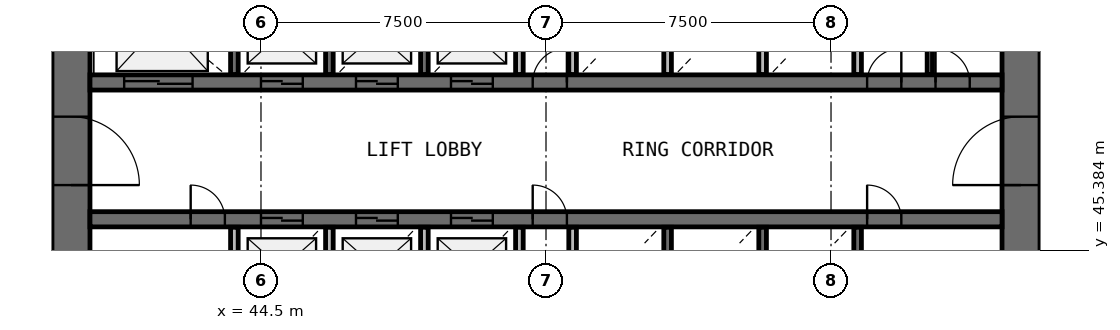
"""IFC4 building model, lengths in metres.
Left out: names, types, materials, properties, quantities, classifications, styles, units other than length and angle.
Written with IfcOpenShell. Run it as: python <this file> out.ifc"""

import sys

from ifc_helpers import new_model, si_unit, direction, frame, frame_2d, origin, place, context, subcontext, project, spatial, rectangle, extrude, source, transform, mapped, element, fill, save


model = new_model("IFC4")
c1 = context("Model", 3, precision=1e-05, world=origin(), true_north=direction((0.0, 1.0)))
c2 = subcontext(c1, "Body", "Model", "MODEL_VIEW")
j1 = project(units=[si_unit("LENGTHUNIT", "METRE"), si_unit("PLANEANGLEUNIT", "RADIAN")], contexts=[c1])
p1 = place(None, origin())
s1 = spatial("IfcSite", under=j1, at=p1, CompositionType="ELEMENT")
p2 = place(p1, origin())
s2 = spatial("IfcBuilding", under=s1, at=p2, CompositionType="ELEMENT")
p3 = place(p2, frame((0.0, 0.0, 40.2)))
s3 = spatial("IfcBuildingStorey", under=s2, at=p3, CompositionType="ELEMENT", Elevation=40.2)
p4 = place(p3, frame((64.5, 38.0, 0.0), z_axis=(0.0, 0.0, 1.0), x_axis=(0.0, 1.0, 0.0)))
e1 = element("IfcWall", 1, at=p4, inside=s3, PredefinedType="SHEAR", context=c2, shape_type="SweptSolid", body=[
    extrude(rectangle(XDim=20.0, YDim=1.0, at=frame_2d((10.0, 0.0))), origin(), (0.0, 0.0, 1.0), 4.4),
])
p5 = place(p4, frame((9.1, 0.0, 0.0)))
e2 = element("IfcOpeningElement", 2, at=p5, cuts=e1, PredefinedType="OPENING", context=c2, shape_type="SweptSolid", body=[
    extrude(rectangle(XDim=1.8, YDim=2.1, at=frame_2d((0.9, 1.05))), frame((0.0, 0.51, 0.0), z_axis=(0.0, -1.0, 0.0), x_axis=(1.0, 0.0, 0.0)), (0.0, 0.0, 1.0), 1.02),
])
p6 = place(p3, frame((39.5, 58.0, 0.0), z_axis=(0.0, 0.0, 1.0), x_axis=(0.0, -1.0, 0.0)))
e3 = element("IfcWall", 3, at=p6, inside=s3, PredefinedType="SHEAR", context=c2, shape_type="SweptSolid", body=[
    extrude(rectangle(XDim=20.0, YDim=1.0, at=frame_2d((10.0, 0.0))), origin(), (0.0, 0.0, 1.0), 4.4),
])
p7 = place(p6, frame((9.1, 0.0, 0.0)))
e4 = element("IfcOpeningElement", 4, at=p7, cuts=e3, PredefinedType="OPENING", context=c2, shape_type="SweptSolid", body=[
    extrude(rectangle(XDim=1.8, YDim=2.1, at=frame_2d((0.9, 1.05))), frame((0.0, 0.51, 0.0), z_axis=(0.0, -1.0, 0.0), x_axis=(1.0, 0.0, 0.0)), (0.0, 0.0, 1.0), 1.02),
])
p8 = place(p3, frame((40.0, 49.8, 0.0), z_axis=(0.0, 0.0, 1.0), x_axis=(1.0, 0.0, 0.0)))
e5 = element("IfcWall", 5, at=p8, inside=s3, PredefinedType="SHEAR", context=c2, shape_type="SweptSolid", body=[
    extrude(rectangle(XDim=24.0, YDim=0.4, at=frame_2d((12.0, 0.0))), origin(), (0.0, 0.0, 1.0), 4.4),
])
p9 = place(p8, frame((4.5, 0.0, 0.0)))
e6 = element("IfcOpeningElement", 6, at=p9, cuts=e5, PredefinedType="OPENING", context=c2, shape_type="SweptSolid", body=[
    extrude(rectangle(XDim=1.1, YDim=2.1, at=frame_2d((0.55, 1.05))), frame((0.0, 0.21, 0.0), z_axis=(0.0, -1.0, 0.0), x_axis=(1.0, 0.0, 0.0)), (0.0, 0.0, 1.0), 0.42),
])
p10 = place(p8, frame((7.0, 0.0, 0.0)))
e7 = element("IfcOpeningElement", 7, at=p10, cuts=e5, PredefinedType="OPENING", context=c2, shape_type="SweptSolid", body=[
    extrude(rectangle(XDim=1.1, YDim=2.1, at=frame_2d((0.55, 1.05))), frame((0.0, 0.21, 0.0), z_axis=(0.0, -1.0, 0.0), x_axis=(1.0, 0.0, 0.0)), (0.0, 0.0, 1.0), 0.42),
])
p11 = place(p8, frame((9.5, 0.0, 0.0)))
e8 = element("IfcOpeningElement", 8, at=p11, cuts=e5, PredefinedType="OPENING", context=c2, shape_type="SweptSolid", body=[
    extrude(rectangle(XDim=1.1, YDim=2.1, at=frame_2d((0.55, 1.05))), frame((0.0, 0.21, 0.0), z_axis=(0.0, -1.0, 0.0), x_axis=(1.0, 0.0, 0.0)), (0.0, 0.0, 1.0), 0.42),
])
p12 = place(p8, frame((0.9, 0.0, 0.0)))
e9 = element("IfcOpeningElement", 9, at=p12, cuts=e5, PredefinedType="OPENING", context=c2, shape_type="SweptSolid", body=[
    extrude(rectangle(XDim=1.8, YDim=2.4, at=frame_2d((0.9, 1.2))), frame((0.0, 0.21, 0.0), z_axis=(0.0, -1.0, 0.0), x_axis=(1.0, 0.0, 0.0)), (0.0, 0.0, 1.0), 0.42),
])
p13 = place(p8, frame((20.45, 0.0, 0.0)))
e10 = element("IfcOpeningElement", 10, at=p13, cuts=e5, PredefinedType="OPENING", context=c2, shape_type="SweptSolid", body=[
    extrude(rectangle(XDim=0.9, YDim=2.1, at=frame_2d((0.45, 1.05))), frame((0.0, 0.21, 0.0), z_axis=(0.0, -1.0, 0.0), x_axis=(1.0, 0.0, 0.0)), (0.0, 0.0, 1.0), 0.42),
])
p14 = place(p8, frame((22.25, 0.0, 0.0)))
e11 = element("IfcOpeningElement", 11, at=p14, cuts=e5, PredefinedType="OPENING", context=c2, shape_type="SweptSolid", body=[
    extrude(rectangle(XDim=0.9, YDim=2.1, at=frame_2d((0.45, 1.05))), frame((0.0, 0.21, 0.0), z_axis=(0.0, -1.0, 0.0), x_axis=(1.0, 0.0, 0.0)), (0.0, 0.0, 1.0), 0.42),
])
p15 = place(p8, frame((11.65, 0.0, 0.0)))
e12 = element("IfcOpeningElement", 12, at=p15, cuts=e5, PredefinedType="OPENING", context=c2, shape_type="SweptSolid", body=[
    extrude(rectangle(XDim=0.9, YDim=2.1, at=frame_2d((0.45, 1.05))), frame((0.0, 0.21, 0.0), z_axis=(0.0, -1.0, 0.0), x_axis=(1.0, 0.0, 0.0)), (0.0, 0.0, 1.0), 0.42),
])
p16 = place(p3, frame((40.0, 46.2, 0.0), z_axis=(0.0, 0.0, 1.0), x_axis=(1.0, 0.0, 0.0)))
e13 = element("IfcWall", 13, at=p16, inside=s3, PredefinedType="SHEAR", context=c2, shape_type="SweptSolid", body=[
    extrude(rectangle(XDim=24.0, YDim=0.4, at=frame_2d((12.0, 0.0))), origin(), (0.0, 0.0, 1.0), 4.4),
])
p17 = place(p16, frame((4.5, 0.0, 0.0)))
e14 = element("IfcOpeningElement", 14, at=p17, cuts=e13, PredefinedType="OPENING", context=c2, shape_type="SweptSolid", body=[
    extrude(rectangle(XDim=1.1, YDim=2.1, at=frame_2d((0.55, 1.05))), frame((0.0, 0.21, 0.0), z_axis=(0.0, -1.0, 0.0), x_axis=(1.0, 0.0, 0.0)), (0.0, 0.0, 1.0), 0.42),
])
p18 = place(p16, frame((7.0, 0.0, 0.0)))
e15 = element("IfcOpeningElement", 15, at=p18, cuts=e13, PredefinedType="OPENING", context=c2, shape_type="SweptSolid", body=[
    extrude(rectangle(XDim=1.1, YDim=2.1, at=frame_2d((0.55, 1.05))), frame((0.0, 0.21, 0.0), z_axis=(0.0, -1.0, 0.0), x_axis=(1.0, 0.0, 0.0)), (0.0, 0.0, 1.0), 0.42),
])
p19 = place(p16, frame((9.5, 0.0, 0.0)))
e16 = element("IfcOpeningElement", 16, at=p19, cuts=e13, PredefinedType="OPENING", context=c2, shape_type="SweptSolid", body=[
    extrude(rectangle(XDim=1.1, YDim=2.1, at=frame_2d((0.55, 1.05))), frame((0.0, 0.21, 0.0), z_axis=(0.0, -1.0, 0.0), x_axis=(1.0, 0.0, 0.0)), (0.0, 0.0, 1.0), 0.42),
])
p20 = place(p16, frame((20.45, 0.0, 0.0)))
e17 = element("IfcOpeningElement", 17, at=p20, cuts=e13, PredefinedType="OPENING", context=c2, shape_type="SweptSolid", body=[
    extrude(rectangle(XDim=0.9, YDim=2.1, at=frame_2d((0.45, 1.05))), frame((0.0, 0.21, 0.0), z_axis=(0.0, -1.0, 0.0), x_axis=(1.0, 0.0, 0.0)), (0.0, 0.0, 1.0), 0.42),
])
p21 = place(p16, frame((2.65, 0.0, 0.0)))
e18 = element("IfcOpeningElement", 18, at=p21, cuts=e13, PredefinedType="OPENING", context=c2, shape_type="SweptSolid", body=[
    extrude(rectangle(XDim=0.9, YDim=2.1, at=frame_2d((0.45, 1.05))), frame((0.0, 0.21, 0.0), z_axis=(0.0, -1.0, 0.0), x_axis=(1.0, 0.0, 0.0)), (0.0, 0.0, 1.0), 0.42),
])
p22 = place(p16, frame((11.65, 0.0, 0.0)))
e19 = element("IfcOpeningElement", 19, at=p22, cuts=e13, PredefinedType="OPENING", context=c2, shape_type="SweptSolid", body=[
    extrude(rectangle(XDim=0.9, YDim=2.1, at=frame_2d((0.45, 1.05))), frame((0.0, 0.21, 0.0), z_axis=(0.0, -1.0, 0.0), x_axis=(1.0, 0.0, 0.0)), (0.0, 0.0, 1.0), 0.42),
])
for number, where, z_axis, x_axis in (
    (20, (43.8, 45.99, 0.0), (0.0, 0.0, 1.0), (0.0, -1.0, 0.0)),
    (21, (43.8, 52.37, 0.0), (0.0, 0.0, 1.0), (0.0, -1.0, 0.0)),
):
    element("IfcWall", number, at=place(p3, frame(where, z_axis=z_axis, x_axis=x_axis)), inside=s3, PredefinedType="SOLIDWALL", context=c2, shape_type="SweptSolid", body=[
        extrude(rectangle(XDim=2.36, YDim=0.2, at=frame_2d((1.18, 0.0))), origin(), (0.0, 0.0, 1.0), 3.95),
    ])
p23 = place(p3, frame((46.3, 43.6, 0.0), z_axis=(0.0, 0.0, 1.0), x_axis=(0.0, 1.0, 0.0)))
e22 = element("IfcWall", 22, at=p23, inside=s3, PredefinedType="SOLIDWALL", context=c2, shape_type="SweptSolid", body=[
    extrude(rectangle(XDim=2.39, YDim=0.2, at=frame_2d((1.195, 0.0))), origin(), (0.0, 0.0, 1.0), 3.95),
])
for number, where, z_axis, x_axis in (
    (23, (46.3, 50.01, 0.0), (0.0, 0.0, 1.0), (0.0, 1.0, 0.0)),
    (24, (48.8, 43.63, 0.0), (0.0, 0.0, 1.0), (0.0, 1.0, 0.0)),
    (25, (48.8, 50.01, 0.0), (0.0, 0.0, 1.0), (0.0, 1.0, 0.0)),
    (26, (51.3, 43.63, 0.0), (0.0, 0.0, 1.0), (0.0, 1.0, 0.0)),
):
    element("IfcWall", number, at=place(p3, frame(where, z_axis=z_axis, x_axis=x_axis)), inside=s3, PredefinedType="SOLIDWALL", context=c2, shape_type="SweptSolid", body=[
        extrude(rectangle(XDim=2.36, YDim=0.2, at=frame_2d((1.18, 0.0))), origin(), (0.0, 0.0, 1.0), 3.95),
    ])
for number, where, z_axis, x_axis in (
    (27, (51.3, 50.01, 0.0), (0.0, 0.0, 1.0), (0.0, 1.0, 0.0)),
    (28, (52.7, 45.99, 0.0), (0.0, 0.0, 1.0), (0.0, -1.0, 0.0)),
):
    element("IfcWall", number, at=place(p3, frame(where, z_axis=z_axis, x_axis=x_axis)), inside=s3, PredefinedType="SOLIDWALL", context=c2, shape_type="SweptSolid", body=[
        extrude(rectangle(XDim=2.39, YDim=0.2, at=frame_2d((1.195, 0.0))), origin(), (0.0, 0.0, 1.0), 3.95),
    ])
for number, where, z_axis, x_axis in (
    (29, (52.7, 52.37, 0.0), (0.0, 0.0, 1.0), (0.0, -1.0, 0.0)),
    (30, (55.2, 43.63, 0.0), (0.0, 0.0, 1.0), (0.0, 1.0, 0.0)),
    (31, (55.2, 50.01, 0.0), (0.0, 0.0, 1.0), (0.0, 1.0, 0.0)),
    (32, (57.7, 43.63, 0.0), (0.0, 0.0, 1.0), (0.0, 1.0, 0.0)),
):
    element("IfcWall", number, at=place(p3, frame(where, z_axis=z_axis, x_axis=x_axis)), inside=s3, PredefinedType="SOLIDWALL", context=c2, shape_type="SweptSolid", body=[
        extrude(rectangle(XDim=2.36, YDim=0.2, at=frame_2d((1.18, 0.0))), origin(), (0.0, 0.0, 1.0), 3.95),
    ])
p24 = place(p3, frame((57.7, 50.01, 0.0), z_axis=(0.0, 0.0, 1.0), x_axis=(0.0, 1.0, 0.0)))
e33 = element("IfcWall", 33, at=p24, inside=s3, PredefinedType="SOLIDWALL", context=c2, shape_type="SweptSolid", body=[
    extrude(rectangle(XDim=2.39, YDim=0.2, at=frame_2d((1.195, 0.0))), origin(), (0.0, 0.0, 1.0), 3.95),
])
for number, where, z_axis, x_axis in (
    (34, (60.2, 43.63, 0.0), (0.0, 0.0, 1.0), (0.0, 1.0, 0.0)),
    (35, (60.2, 50.01, 0.0), (0.0, 0.0, 1.0), (0.0, 1.0, 0.0)),
):
    element("IfcWall", number, at=place(p3, frame(where, z_axis=z_axis, x_axis=x_axis)), inside=s3, PredefinedType="SOLIDWALL", context=c2, shape_type="SweptSolid", body=[
        extrude(rectangle(XDim=2.36, YDim=0.2, at=frame_2d((1.18, 0.0))), origin(), (0.0, 0.0, 1.0), 3.95),
    ])
p25 = place(p3, frame((62.1, 50.01, 0.0), z_axis=(0.0, 0.0, 1.0), x_axis=(0.0, 1.0, 0.0)))
e36 = element("IfcWall", 36, at=p25, inside=s3, PredefinedType="PARTITIONING", context=c2, shape_type="SweptSolid", body=[
    extrude(rectangle(XDim=2.39, YDim=0.14, at=frame_2d((1.195, 0.0))), origin(), (0.0, 0.0, 1.0), 3.05),
])
m1 = source(origin(), c2, "Body", "SweptSolid", [
    extrude(rectangle(XDim=1.8, YDim=2.1, at=frame_2d((0.9, 1.05))), frame((0.0, 0.025, 0.0), z_axis=(0.0, -1.0, 0.0), x_axis=(1.0, 0.0, 0.0)), (0.0, 0.0, 1.0), 0.05),
])
p26 = place(p7, origin())
e37 = element("IfcDoor", 37, at=p26, inside=s3, OperationType="SINGLE_SWING_RIGHT", PredefinedType="DOOR", context=c2, shape_type="MappedRepresentation", body=[
    mapped(m1, transform((0.0, 0.0, 0.0), scale=1.0)),
])
fill(e4, e37)
p27 = place(p5, origin())
e38 = element("IfcDoor", 38, at=p27, inside=s3, OperationType="SINGLE_SWING_LEFT", PredefinedType="DOOR", context=c2, shape_type="MappedRepresentation", body=[
    mapped(m1, transform((0.0, 0.0, 0.0), scale=1.0)),
])
fill(e2, e38)
m2 = source(origin(), c2, "Body", "SweptSolid", [
    extrude(rectangle(XDim=1.1, YDim=2.1, at=frame_2d((0.55, 1.05))), frame((0.0, 0.025, 0.0), z_axis=(0.0, -1.0, 0.0), x_axis=(1.0, 0.0, 0.0)), (0.0, 0.0, 1.0), 0.05),
])
p28 = place(p9, origin())
e39 = element("IfcDoor", 39, at=p28, inside=s3, OperationType="DOUBLE_DOOR_SLIDING", PredefinedType="USERDEFINED", context=c2, shape_type="MappedRepresentation", body=[
    mapped(m2, transform((0.0, 0.0, 0.0), scale=1.0)),
])
fill(e6, e39)
p29 = place(p10, origin())
e40 = element("IfcDoor", 40, at=p29, inside=s3, OperationType="DOUBLE_DOOR_SLIDING", PredefinedType="USERDEFINED", context=c2, shape_type="MappedRepresentation", body=[
    mapped(m2, transform((0.0, 0.0, 0.0), scale=1.0)),
])
fill(e7, e40)
p30 = place(p11, origin())
e41 = element("IfcDoor", 41, at=p30, inside=s3, OperationType="DOUBLE_DOOR_SLIDING", PredefinedType="USERDEFINED", context=c2, shape_type="MappedRepresentation", body=[
    mapped(m2, transform((0.0, 0.0, 0.0), scale=1.0)),
])
fill(e8, e41)
p31 = place(p17, origin())
e42 = element("IfcDoor", 42, at=p31, inside=s3, OperationType="DOUBLE_DOOR_SLIDING", PredefinedType="USERDEFINED", context=c2, shape_type="MappedRepresentation", body=[
    mapped(m2, transform((0.0, 0.0, 0.0), scale=1.0)),
])
fill(e14, e42)
p32 = place(p18, origin())
e43 = element("IfcDoor", 43, at=p32, inside=s3, OperationType="DOUBLE_DOOR_SLIDING", PredefinedType="USERDEFINED", context=c2, shape_type="MappedRepresentation", body=[
    mapped(m2, transform((0.0, 0.0, 0.0), scale=1.0)),
])
fill(e15, e43)
p33 = place(p19, origin())
e44 = element("IfcDoor", 44, at=p33, inside=s3, OperationType="DOUBLE_DOOR_SLIDING", PredefinedType="USERDEFINED", context=c2, shape_type="MappedRepresentation", body=[
    mapped(m2, transform((0.0, 0.0, 0.0), scale=1.0)),
])
fill(e16, e44)
m3 = source(origin(), c2, "Body", "SweptSolid", [
    extrude(rectangle(XDim=1.8, YDim=2.4, at=frame_2d((0.9, 1.2))), frame((0.0, 0.025, 0.0), z_axis=(0.0, -1.0, 0.0), x_axis=(1.0, 0.0, 0.0)), (0.0, 0.0, 1.0), 0.05),
])
p34 = place(p12, origin())
e45 = element("IfcDoor", 45, at=p34, inside=s3, OperationType="DOUBLE_DOOR_SLIDING", PredefinedType="USERDEFINED", context=c2, shape_type="MappedRepresentation", body=[
    mapped(m3, transform((0.0, 0.0, 0.0), scale=1.0)),
])
fill(e9, e45)
m4 = source(origin(), c2, "Body", "SweptSolid", [
    extrude(rectangle(XDim=0.9, YDim=2.1, at=frame_2d((0.45, 1.05))), frame((0.0, 0.025, 0.0), z_axis=(0.0, -1.0, 0.0), x_axis=(1.0, 0.0, 0.0)), (0.0, 0.0, 1.0), 0.05),
])
p35 = place(p20, origin())
e46 = element("IfcDoor", 46, at=p35, inside=s3, OperationType="SINGLE_SWING_LEFT", PredefinedType="DOOR", context=c2, shape_type="MappedRepresentation", body=[
    mapped(m4, transform((0.0, 0.0, 0.0), scale=1.0)),
])
fill(e17, e46)
p36 = place(p13, origin())
e47 = element("IfcDoor", 47, at=p36, inside=s3, OperationType="SINGLE_SWING_RIGHT", PredefinedType="DOOR", context=c2, shape_type="MappedRepresentation", body=[
    mapped(m4, transform((0.0, 0.0, 0.0), scale=1.0)),
])
fill(e10, e47)
p37 = place(p14, origin())
e48 = element("IfcDoor", 48, at=p37, inside=s3, OperationType="SINGLE_SWING_LEFT", PredefinedType="DOOR", context=c2, shape_type="MappedRepresentation", body=[
    mapped(m4, transform((0.0, 0.0, 0.0), scale=1.0)),
])
fill(e11, e48)
p38 = place(p21, origin())
e49 = element("IfcDoor", 49, at=p38, inside=s3, OperationType="SINGLE_SWING_LEFT", PredefinedType="DOOR", context=c2, shape_type="MappedRepresentation", body=[
    mapped(m4, transform((0.0, 0.0, 0.0), scale=1.0)),
])
fill(e18, e49)
p39 = place(p15, origin())
e50 = element("IfcDoor", 50, at=p39, inside=s3, OperationType="SINGLE_SWING_RIGHT", PredefinedType="DOOR", context=c2, shape_type="MappedRepresentation", body=[
    mapped(m4, transform((0.0, 0.0, 0.0), scale=1.0)),
])
fill(e12, e50)
p40 = place(p22, origin())
e51 = element("IfcDoor", 51, at=p40, inside=s3, OperationType="SINGLE_SWING_LEFT", PredefinedType="DOOR", context=c2, shape_type="MappedRepresentation", body=[
    mapped(m4, transform((0.0, 0.0, 0.0), scale=1.0)),
])
fill(e19, e51)
save(model, sys.argv[1])
